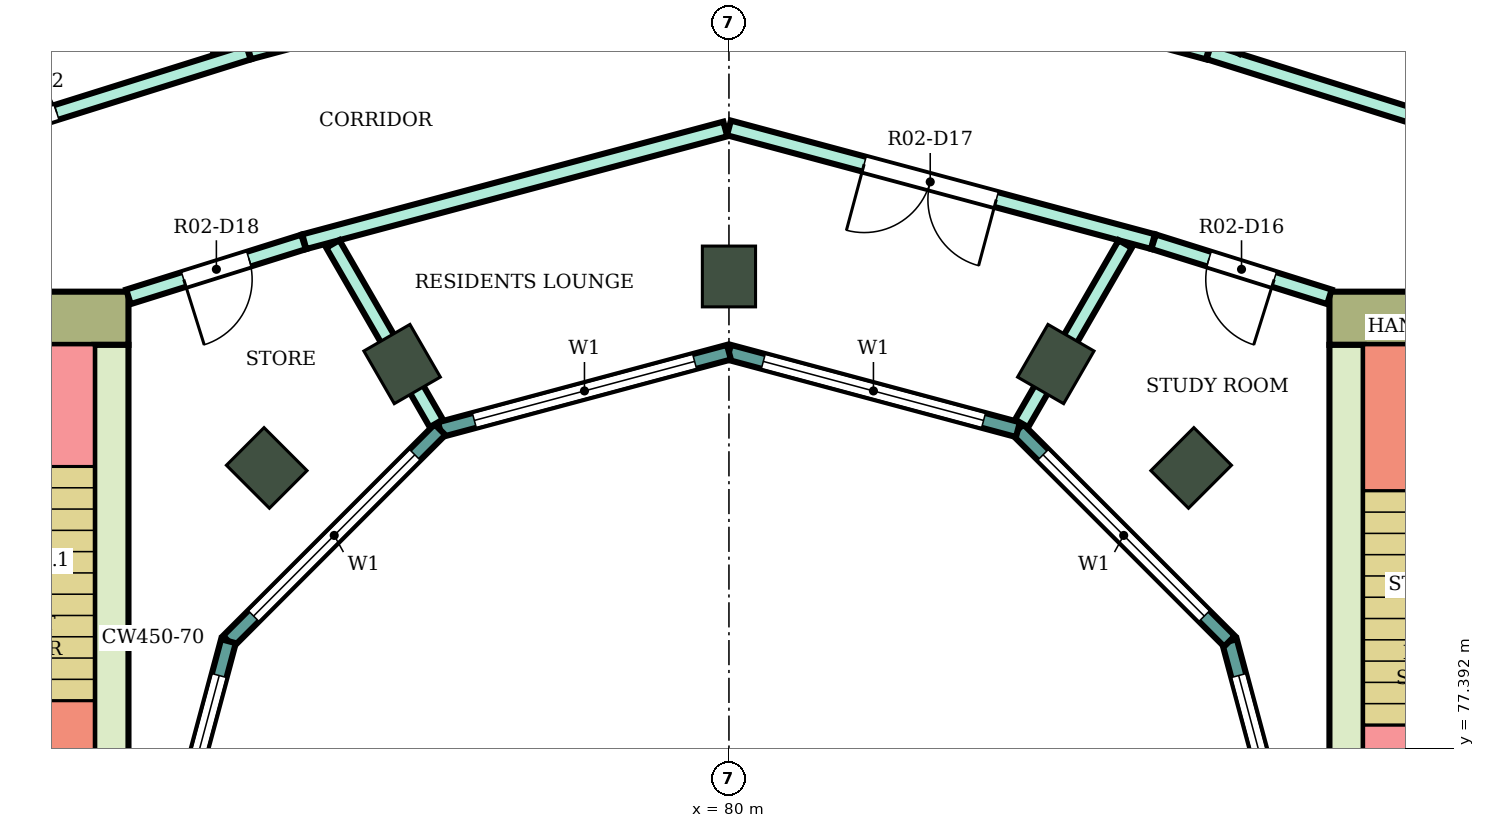
"""IFC4 building model, lengths in metres.
Left out: names, types, materials, properties, quantities, classifications, styles, units other than length and angle.
Written with IfcOpenShell. Run it as: python <this file> out.ifc"""

import sys

from ifc_helpers import new_model, si_unit, direction, frame, frame_2d, origin, origin_2d, place, context, subcontext, project, spatial, rectangle, extrude, element, fill, save


model = new_model("IFC4")
c1 = context("Model", 3, precision=1e-05, world=origin(), true_north=direction((0.0, 1.0)))
c2 = subcontext(c1, "Body", "Model", "MODEL_VIEW")
j1 = project(units=[si_unit("LENGTHUNIT", "METRE"), si_unit("PLANEANGLEUNIT", "RADIAN")], contexts=[c1])
p1 = place(None, origin())
s1 = spatial("IfcSite", under=j1, at=p1, CompositionType="ELEMENT")
p2 = place(p1, origin())
s2 = spatial("IfcBuilding", under=s1, at=p2, CompositionType="ELEMENT")
p3 = place(p2, frame((0.0, 0.0, 174.1)))
s3 = spatial("IfcBuildingStorey", under=s2, at=p3, CompositionType="ELEMENT", Elevation=174.1)
for number, where, z_axis, x_axis in (
    (1, (86.081, 81.081, 0.0), (0.0, 0.0, 1.0), (0.707, 0.707, 0.0)),
    (2, (84.3, 82.448, 0.0), (0.0, 0.0, 1.0), (0.5, 0.866, 0.0)),
    (3, (80.0, 83.6, 0.0), (0.0, 0.0, 1.0), (0.0, 1.0, 0.0)),
    (4, (75.7, 82.448, 0.0), (0.0, 0.0, 1.0), (-0.5, 0.866, 0.0)),
    (5, (73.919, 81.081, 0.0), (0.0, 0.0, 1.0), (-0.707, 0.707, 0.0)),
):
    element("IfcColumn", number, at=place(p3, frame(where, z_axis=z_axis, x_axis=x_axis)), inside=s3, PredefinedType="COLUMN", context=c2, shape_type="SweptSolid", body=[
        extrude(rectangle(XDim=0.8, YDim=0.7, at=origin_2d()), origin(), (0.0, 0.0, 1.0), 4.1),
    ])
p4 = place(p3, frame((87.9, 83.05, 0.0), z_axis=(0.0, 0.0, 1.0), x_axis=(1.0, 0.0, 0.0)))
e6 = element("IfcWall", 6, at=p4, inside=s3, PredefinedType="SHEAR", context=c2, shape_type="SweptSolid", body=[
    extrude(rectangle(XDim=14.8, YDim=0.7, at=frame_2d((7.4, 0.0))), origin(), (0.0, 0.0, 1.0), 3.78),
])
p5 = place(p4, frame((4.2, 0.0, 0.0)))
e7 = element("IfcOpeningElement", 7, at=p5, cuts=e6, PredefinedType="OPENING", context=c2, shape_type="SweptSolid", body=[
    extrude(rectangle(XDim=2.4, YDim=2.4, at=frame_2d((1.2, 1.2))), frame((0.0, 0.36, 0.0), z_axis=(0.0, -1.0, 0.0), x_axis=(1.0, 0.0, 0.0)), (0.0, 0.0, 1.0), 0.72),
])
p6 = place(p3, frame((88.125, 75.0, 0.0), z_axis=(0.0, 0.0, 1.0), x_axis=(0.0, 1.0, 0.0)))
e8 = element("IfcWall", 8, at=p6, inside=s3, PredefinedType="SHEAR", context=c2, shape_type="SweptSolid", body=[
    extrude(rectangle(XDim=7.7, YDim=0.45, at=frame_2d((3.85, 0.0))), origin(), (0.0, 0.0, 1.0), 3.78),
])
p7 = place(p3, frame((72.1, 83.05, 0.0), z_axis=(0.0, 0.0, 1.0), x_axis=(-1.0, 0.0, 0.0)))
e9 = element("IfcWall", 9, at=p7, inside=s3, PredefinedType="SHEAR", context=c2, shape_type="SweptSolid", body=[
    extrude(rectangle(XDim=14.8, YDim=0.7, at=frame_2d((7.4, 0.0))), origin(), (0.0, 0.0, 1.0), 3.78),
])
p8 = place(p7, frame((4.2, 0.0, 0.0)))
e10 = element("IfcOpeningElement", 10, at=p8, cuts=e9, PredefinedType="OPENING", context=c2, shape_type="SweptSolid", body=[
    extrude(rectangle(XDim=2.4, YDim=2.4, at=frame_2d((1.2, 1.2))), frame((0.0, 0.36, 0.0), z_axis=(0.0, -1.0, 0.0), x_axis=(1.0, 0.0, 0.0)), (0.0, 0.0, 1.0), 0.72),
])
p9 = place(p3, frame((71.875, 82.7, 0.0), z_axis=(0.0, 0.0, 1.0), x_axis=(0.0, -1.0, 0.0)))
e11 = element("IfcWall", 11, at=p9, inside=s3, PredefinedType="SHEAR", context=c2, shape_type="SweptSolid", body=[
    extrude(rectangle(XDim=7.7, YDim=0.45, at=frame_2d((3.85, 0.0))), origin(), (0.0, 0.0, 1.0), 3.78),
])
p10 = place(p3, frame((87.604, 75.0, 0.0), z_axis=(0.0, 0.0, 1.0), x_axis=(-0.258789828301, 0.965933654434, 0.0)))
e12 = element("IfcWall", 12, at=p10, inside=s3, PredefinedType="NOTDEFINED", context=c2, shape_type="SweptSolid", body=[
    extrude(rectangle(XDim=3.936, YDim=0.2, at=frame_2d((1.968, 0.0))), origin(), (0.0, 0.0, 1.0), 4.1),
])
p11 = place(p10, frame((0.468, 0.0, 0.9)))
e13 = element("IfcOpeningElement", 13, at=p11, cuts=e12, PredefinedType="OPENING", context=c2, shape_type="SweptSolid", body=[
    extrude(rectangle(XDim=3.0, YDim=2.3, at=frame_2d((1.5, 1.15))), frame((0.0, 0.11, 0.0), z_axis=(0.0, -1.0, 0.0), x_axis=(1.0, 0.0, 0.0)), (0.0, 0.0, 1.0), 0.22),
])
p12 = place(p3, frame((86.585, 78.802, 0.0), z_axis=(0.0, 0.0, 1.0), x_axis=(-0.707106781187, 0.707106781187, 0.0)))
e14 = element("IfcWall", 14, at=p12, inside=s3, PredefinedType="NOTDEFINED", context=c2, shape_type="SweptSolid", body=[
    extrude(rectangle(XDim=3.936, YDim=0.2, at=frame_2d((1.968, 0.0))), origin(), (0.0, 0.0, 1.0), 4.1),
])
p13 = place(p12, frame((0.468, 0.0, 0.9)))
e15 = element("IfcOpeningElement", 15, at=p13, cuts=e14, PredefinedType="OPENING", context=c2, shape_type="SweptSolid", body=[
    extrude(rectangle(XDim=3.0, YDim=2.3, at=frame_2d((1.5, 1.15))), frame((0.0, 0.11, 0.0), z_axis=(0.0, -1.0, 0.0), x_axis=(1.0, 0.0, 0.0)), (0.0, 0.0, 1.0), 0.22),
])
p14 = place(p3, frame((83.802, 81.585, 0.0), z_axis=(0.0, 0.0, 1.0), x_axis=(-0.965933654434, 0.258789828301, 0.0)))
e16 = element("IfcWall", 16, at=p14, inside=s3, PredefinedType="NOTDEFINED", context=c2, shape_type="SweptSolid", body=[
    extrude(rectangle(XDim=3.936, YDim=0.2, at=frame_2d((1.968, 0.0))), origin(), (0.0, 0.0, 1.0), 4.1),
])
p15 = place(p14, frame((0.468, 0.0, 0.9)))
e17 = element("IfcOpeningElement", 17, at=p15, cuts=e16, PredefinedType="OPENING", context=c2, shape_type="SweptSolid", body=[
    extrude(rectangle(XDim=3.0, YDim=2.3, at=frame_2d((1.5, 1.15))), frame((0.0, 0.11, 0.0), z_axis=(0.0, -1.0, 0.0), x_axis=(1.0, 0.0, 0.0)), (0.0, 0.0, 1.0), 0.22),
])
p16 = place(p3, frame((80.0, 82.604, 0.0), z_axis=(0.0, 0.0, 1.0), x_axis=(-0.965933654434, -0.258789828301, 0.0)))
e18 = element("IfcWall", 18, at=p16, inside=s3, PredefinedType="NOTDEFINED", context=c2, shape_type="SweptSolid", body=[
    extrude(rectangle(XDim=3.936, YDim=0.2, at=frame_2d((1.968, 0.0))), origin(), (0.0, 0.0, 1.0), 4.1),
])
p17 = place(p16, frame((0.468, 0.0, 0.9)))
e19 = element("IfcOpeningElement", 19, at=p17, cuts=e18, PredefinedType="OPENING", context=c2, shape_type="SweptSolid", body=[
    extrude(rectangle(XDim=3.0, YDim=2.3, at=frame_2d((1.5, 1.15))), frame((0.0, 0.11, 0.0), z_axis=(0.0, -1.0, 0.0), x_axis=(1.0, 0.0, 0.0)), (0.0, 0.0, 1.0), 0.22),
])
p18 = place(p3, frame((76.198, 81.585, 0.0), z_axis=(0.0, 0.0, 1.0), x_axis=(-0.707106781187, -0.707106781187, 0.0)))
e20 = element("IfcWall", 20, at=p18, inside=s3, PredefinedType="NOTDEFINED", context=c2, shape_type="SweptSolid", body=[
    extrude(rectangle(XDim=3.936, YDim=0.2, at=frame_2d((1.968, 0.0))), origin(), (0.0, 0.0, 1.0), 4.1),
])
p19 = place(p18, frame((0.468, 0.0, 0.9)))
e21 = element("IfcOpeningElement", 21, at=p19, cuts=e20, PredefinedType="OPENING", context=c2, shape_type="SweptSolid", body=[
    extrude(rectangle(XDim=3.0, YDim=2.3, at=frame_2d((1.5, 1.15))), frame((0.0, 0.11, 0.0), z_axis=(0.0, -1.0, 0.0), x_axis=(1.0, 0.0, 0.0)), (0.0, 0.0, 1.0), 0.22),
])
p20 = place(p3, frame((73.415, 78.802, 0.0), z_axis=(0.0, 0.0, 1.0), x_axis=(-0.258789828301, -0.965933654434, 0.0)))
e22 = element("IfcWall", 22, at=p20, inside=s3, PredefinedType="NOTDEFINED", context=c2, shape_type="SweptSolid", body=[
    extrude(rectangle(XDim=3.936, YDim=0.2, at=frame_2d((1.968, 0.0))), origin(), (0.0, 0.0, 1.0), 4.1),
])
p21 = place(p20, frame((0.468, 0.0, 0.9)))
e23 = element("IfcOpeningElement", 23, at=p21, cuts=e22, PredefinedType="OPENING", context=c2, shape_type="SweptSolid", body=[
    extrude(rectangle(XDim=3.0, YDim=2.3, at=frame_2d((1.5, 1.15))), frame((0.0, 0.11, 0.0), z_axis=(0.0, -1.0, 0.0), x_axis=(1.0, 0.0, 0.0)), (0.0, 0.0, 1.0), 0.22),
])
p22 = place(p3, frame((67.104, 97.343, 0.0), z_axis=(0.0, 0.0, 1.0), x_axis=(0.499841888023, -0.866116670534, 0.0)))
e24 = element("IfcWall", 24, at=p22, inside=s3, PredefinedType="PARTITIONING", context=c2, shape_type="SweptSolid", body=[
    extrude(rectangle(XDim=12.446, YDim=0.2, at=frame_2d((6.223, 0.0))), origin(), (0.0, 0.0, 1.0), 3.65),
])
p23 = place(p3, frame((68.2, 84.833, 0.0), z_axis=(0.0, 0.0, 1.0), x_axis=(0.954191968402, 0.299195065863, 0.0)))
e25 = element("IfcWall", 25, at=p23, inside=s3, PredefinedType="PARTITIONING", context=c2, shape_type="SweptSolid", body=[
    extrude(rectangle(XDim=5.74, YDim=0.2, at=frame_2d((2.87, 0.0))), origin(), (0.0, 0.0, 1.0), 3.65),
])
p24 = place(p23, frame((2.097, 0.0, 0.0)))
e26 = element("IfcOpeningElement", 26, at=p24, cuts=e25, PredefinedType="OPENING", context=c2, shape_type="SweptSolid", body=[
    extrude(rectangle(XDim=1.0, YDim=2.1, at=frame_2d((0.5, 1.05))), frame((0.0, 0.11, 0.0), z_axis=(0.0, -1.0, 0.0), x_axis=(1.0, 0.0, 0.0)), (0.0, 0.0, 1.0), 0.22),
])
p25 = place(p3, frame((72.1, 83.332, 0.0), z_axis=(0.0, 0.0, 1.0), x_axis=(0.954233106619, 0.299063836383, 0.0)))
e27 = element("IfcWall", 27, at=p25, inside=s3, PredefinedType="PARTITIONING", context=c2, shape_type="SweptSolid", body=[
    extrude(rectangle(XDim=2.414, YDim=0.2, at=frame_2d((1.207, 0.0))), origin(), (0.0, 0.0, 1.0), 3.65),
])
p26 = place(p25, frame((0.762, 0.0, 0.0)))
e28 = element("IfcOpeningElement", 28, at=p26, cuts=e27, PredefinedType="OPENING", context=c2, shape_type="SweptSolid", body=[
    extrude(rectangle(XDim=0.9, YDim=2.1, at=frame_2d((0.45, 1.05))), frame((0.0, 0.11, 0.0), z_axis=(0.0, -1.0, 0.0), x_axis=(1.0, 0.0, 0.0)), (0.0, 0.0, 1.0), 0.22),
])
p27 = place(p3, frame((73.687, 86.554, 0.0), z_axis=(0.0, 0.0, 1.0), x_axis=(0.96595928904, 0.258694128106, 0.0)))
e29 = element("IfcWall", 29, at=p27, inside=s3, PredefinedType="PARTITIONING", context=c2, shape_type="SweptSolid", body=[
    extrude(rectangle(XDim=6.496, YDim=0.2, at=frame_2d((3.248, 0.0))), origin(), (0.0, 0.0, 1.0), 3.65),
])
p28 = place(p3, frame((74.413, 84.057, 0.0), z_axis=(0.0, 0.0, 1.0), x_axis=(0.965970849692, 0.258650956976, 0.0)))
e30 = element("IfcWall", 30, at=p28, inside=s3, PredefinedType="PARTITIONING", context=c2, shape_type="SweptSolid", body=[
    extrude(rectangle(XDim=5.734, YDim=0.2, at=frame_2d((2.867, 0.0))), origin(), (0.0, 0.0, 1.0), 3.65),
])
p29 = place(p3, frame((74.788, 84.028, 0.0), z_axis=(0.0, 0.0, 1.0), x_axis=(0.499859501914, -0.866106505198, 0.0)))
e31 = element("IfcWall", 31, at=p29, inside=s3, PredefinedType="PARTITIONING", context=c2, shape_type="SweptSolid", body=[
    extrude(rectangle(XDim=2.724, YDim=0.2, at=frame_2d((1.362, 0.0))), origin(), (0.0, 0.0, 1.0), 3.65),
])
p30 = place(p3, frame((80.0, 85.554, 0.0), z_axis=(0.0, 0.0, 1.0), x_axis=(0.965894438951, -0.258936155845, 0.0)))
e32 = element("IfcWall", 32, at=p30, inside=s3, PredefinedType="PARTITIONING", context=c2, shape_type="SweptSolid", body=[
    extrude(rectangle(XDim=5.774, YDim=0.2, at=frame_2d((2.887, 0.0))), origin(), (0.0, 0.0, 1.0), 3.65),
])
p31 = place(p30, frame((1.841, 0.0, 0.0)))
e33 = element("IfcOpeningElement", 33, at=p31, cuts=e32, PredefinedType="OPENING", context=c2, shape_type="SweptSolid", body=[
    extrude(rectangle(XDim=1.8, YDim=2.1, at=frame_2d((0.9, 1.05))), frame((0.0, 0.11, 0.0), z_axis=(0.0, -1.0, 0.0), x_axis=(1.0, 0.0, 0.0)), (0.0, 0.0, 1.0), 0.22),
])
p32 = place(p3, frame((80.049, 88.237, 0.0), z_axis=(0.0, 0.0, 1.0), x_axis=(0.965582990495, -0.260095152718, 0.0)))
e34 = element("IfcWall", 34, at=p32, inside=s3, PredefinedType="PARTITIONING", context=c2, shape_type="SweptSolid", body=[
    extrude(rectangle(XDim=6.476, YDim=0.2, at=frame_2d((3.238, 0.0))), origin(), (0.0, 0.0, 1.0), 3.65),
])
p33 = place(p32, frame((0.5, 0.0, 0.0)))
e35 = element("IfcOpeningElement", 35, at=p33, cuts=e34, PredefinedType="OPENING", context=c2, shape_type="SweptSolid", body=[
    extrude(rectangle(XDim=1.0, YDim=2.1, at=frame_2d((0.5, 1.05))), frame((0.0, 0.11, 0.0), z_axis=(0.0, -1.0, 0.0), x_axis=(1.0, 0.0, 0.0)), (0.0, 0.0, 1.0), 0.22),
])
p34 = place(p3, frame((83.851, 81.667, 0.0), z_axis=(0.0, 0.0, 1.0), x_axis=(0.500099931433, 0.865967700657, 0.0)))
e36 = element("IfcWall", 36, at=p34, inside=s3, PredefinedType="PARTITIONING", context=c2, shape_type="SweptSolid", body=[
    extrude(rectangle(XDim=2.725, YDim=0.2, at=frame_2d((1.362, 0.0))), origin(), (0.0, 0.0, 1.0), 3.65),
])
p35 = place(p3, frame((85.587, 84.057, 0.0), z_axis=(0.0, 0.0, 1.0), x_axis=(0.954239513179, -0.299043393987, 0.0)))
e37 = element("IfcWall", 37, at=p35, inside=s3, PredefinedType="PARTITIONING", context=c2, shape_type="SweptSolid", body=[
    extrude(rectangle(XDim=2.424, YDim=0.2, at=frame_2d((1.212, 0.0))), origin(), (0.0, 0.0, 1.0), 3.65),
])
p36 = place(p35, frame((0.762, 0.0, 0.0)))
e38 = element("IfcOpeningElement", 38, at=p36, cuts=e37, PredefinedType="OPENING", context=c2, shape_type="SweptSolid", body=[
    extrude(rectangle(XDim=0.9, YDim=2.1, at=frame_2d((0.45, 1.05))), frame((0.0, 0.11, 0.0), z_axis=(0.0, -1.0, 0.0), x_axis=(1.0, 0.0, 0.0)), (0.0, 0.0, 1.0), 0.22),
])
p37 = place(p3, frame((86.313, 86.554, 0.0), z_axis=(0.0, 0.0, 1.0), x_axis=(0.954081217458, -0.299548043717, 0.0)))
e39 = element("IfcWall", 39, at=p37, inside=s3, PredefinedType="PARTITIONING", context=c2, shape_type="SweptSolid", body=[
    extrude(rectangle(XDim=5.721, YDim=0.2, at=frame_2d((2.86, 0.0))), origin(), (0.0, 0.0, 1.0), 3.65),
])
p38 = place(p3, frame((86.672, 86.554, 0.0), z_axis=(0.0, 0.0, 1.0), x_axis=(0.500043115992, 0.866000509324, 0.0)))
e40 = element("IfcWall", 40, at=p38, inside=s3, PredefinedType="PARTITIONING", context=c2, shape_type="SweptSolid", body=[
    extrude(rectangle(XDim=12.456, YDim=0.1, at=frame_2d((6.228, 0.0))), origin(), (0.0, 0.0, 1.0), 3.65),
])
p39 = place(p38, frame((8.956, 0.0, 0.0)))
e41 = element("IfcOpeningElement", 41, at=p39, cuts=e40, PredefinedType="OPENING", context=c2, shape_type="SweptSolid", body=[
    extrude(rectangle(XDim=0.9, YDim=2.1, at=frame_2d((0.45, 1.05))), frame((0.0, 0.06, 0.0), z_axis=(0.0, -1.0, 0.0), x_axis=(1.0, 0.0, 0.0)), (0.0, 0.0, 1.0), 0.12),
])
p40 = place(p11, origin())
e42 = element("IfcWindow", 42, at=p40, inside=s3, PartitioningType="SINGLE_PANEL", PredefinedType="WINDOW", context=c2, shape_type="SweptSolid", body=[
    extrude(rectangle(XDim=3.0, YDim=2.3, at=frame_2d((1.5, 1.15))), frame((0.0, 0.03, 0.0), z_axis=(0.0, -1.0, 0.0), x_axis=(1.0, 0.0, 0.0)), (0.0, 0.0, 1.0), 0.06),
])
fill(e13, e42)
p41 = place(p13, origin())
e43 = element("IfcWindow", 43, at=p41, inside=s3, PartitioningType="SINGLE_PANEL", PredefinedType="WINDOW", context=c2, shape_type="SweptSolid", body=[
    extrude(rectangle(XDim=3.0, YDim=2.3, at=frame_2d((1.5, 1.15))), frame((0.0, 0.03, 0.0), z_axis=(0.0, -1.0, 0.0), x_axis=(1.0, 0.0, 0.0)), (0.0, 0.0, 1.0), 0.06),
])
fill(e15, e43)
p42 = place(p15, origin())
e44 = element("IfcWindow", 44, at=p42, inside=s3, PartitioningType="SINGLE_PANEL", PredefinedType="WINDOW", context=c2, shape_type="SweptSolid", body=[
    extrude(rectangle(XDim=3.0, YDim=2.3, at=frame_2d((1.5, 1.15))), frame((0.0, 0.03, 0.0), z_axis=(0.0, -1.0, 0.0), x_axis=(1.0, 0.0, 0.0)), (0.0, 0.0, 1.0), 0.06),
])
fill(e17, e44)
p43 = place(p17, origin())
e45 = element("IfcWindow", 45, at=p43, inside=s3, PartitioningType="SINGLE_PANEL", PredefinedType="WINDOW", context=c2, shape_type="SweptSolid", body=[
    extrude(rectangle(XDim=3.0, YDim=2.3, at=frame_2d((1.5, 1.15))), frame((0.0, 0.03, 0.0), z_axis=(0.0, -1.0, 0.0), x_axis=(1.0, 0.0, 0.0)), (0.0, 0.0, 1.0), 0.06),
])
fill(e19, e45)
p44 = place(p19, origin())
e46 = element("IfcWindow", 46, at=p44, inside=s3, PartitioningType="SINGLE_PANEL", PredefinedType="WINDOW", context=c2, shape_type="SweptSolid", body=[
    extrude(rectangle(XDim=3.0, YDim=2.3, at=frame_2d((1.5, 1.15))), frame((0.0, 0.03, 0.0), z_axis=(0.0, -1.0, 0.0), x_axis=(1.0, 0.0, 0.0)), (0.0, 0.0, 1.0), 0.06),
])
fill(e21, e46)
p45 = place(p21, origin())
e47 = element("IfcWindow", 47, at=p45, inside=s3, PartitioningType="SINGLE_PANEL", PredefinedType="WINDOW", context=c2, shape_type="SweptSolid", body=[
    extrude(rectangle(XDim=3.0, YDim=2.3, at=frame_2d((1.5, 1.15))), frame((0.0, 0.03, 0.0), z_axis=(0.0, -1.0, 0.0), x_axis=(1.0, 0.0, 0.0)), (0.0, 0.0, 1.0), 0.06),
])
fill(e23, e47)
p46 = place(p24, origin())
e48 = element("IfcDoor", 48, at=p46, inside=s3, OperationType="SINGLE_SWING_LEFT", PredefinedType="DOOR", context=c2, shape_type="SweptSolid", body=[
    extrude(rectangle(XDim=1.0, YDim=2.1, at=frame_2d((0.5, 1.05))), frame((0.0, 0.025, 0.0), z_axis=(0.0, -1.0, 0.0), x_axis=(1.0, 0.0, 0.0)), (0.0, 0.0, 1.0), 0.05),
])
fill(e26, e48)
p47 = place(p36, frame((0.9, 0.0, 0.0), z_axis=(0.0, 0.0, 1.0), x_axis=(-1.0, 0.0, 0.0)))
e49 = element("IfcDoor", 49, at=p47, inside=s3, OperationType="SINGLE_SWING_LEFT", PredefinedType="DOOR", context=c2, shape_type="SweptSolid", body=[
    extrude(rectangle(XDim=0.9, YDim=2.1, at=frame_2d((0.45, 1.05))), frame((0.0, 0.025, 0.0), z_axis=(0.0, -1.0, 0.0), x_axis=(1.0, 0.0, 0.0)), (0.0, 0.0, 1.0), 0.05),
])
fill(e38, e49)
p48 = place(p31, frame((1.8, 0.0, 0.0), z_axis=(0.0, 0.0, 1.0), x_axis=(-1.0, 0.0, 0.0)))
e50 = element("IfcDoor", 50, at=p48, inside=s3, OperationType="DOUBLE_DOOR_SINGLE_SWING", PredefinedType="DOOR", context=c2, shape_type="SweptSolid", body=[
    extrude(rectangle(XDim=1.8, YDim=2.1, at=frame_2d((0.9, 1.05))), frame((0.0, 0.025, 0.0), z_axis=(0.0, -1.0, 0.0), x_axis=(1.0, 0.0, 0.0)), (0.0, 0.0, 1.0), 0.05),
])
fill(e33, e50)
p49 = place(p26, frame((0.9, 0.0, 0.0), z_axis=(0.0, 0.0, 1.0), x_axis=(-1.0, 0.0, 0.0)))
e51 = element("IfcDoor", 51, at=p49, inside=s3, OperationType="SINGLE_SWING_RIGHT", PredefinedType="DOOR", context=c2, shape_type="SweptSolid", body=[
    extrude(rectangle(XDim=0.9, YDim=2.1, at=frame_2d((0.45, 1.05))), frame((0.0, 0.025, 0.0), z_axis=(0.0, -1.0, 0.0), x_axis=(1.0, 0.0, 0.0)), (0.0, 0.0, 1.0), 0.05),
])
fill(e28, e51)
save(model, sys.argv[1])
